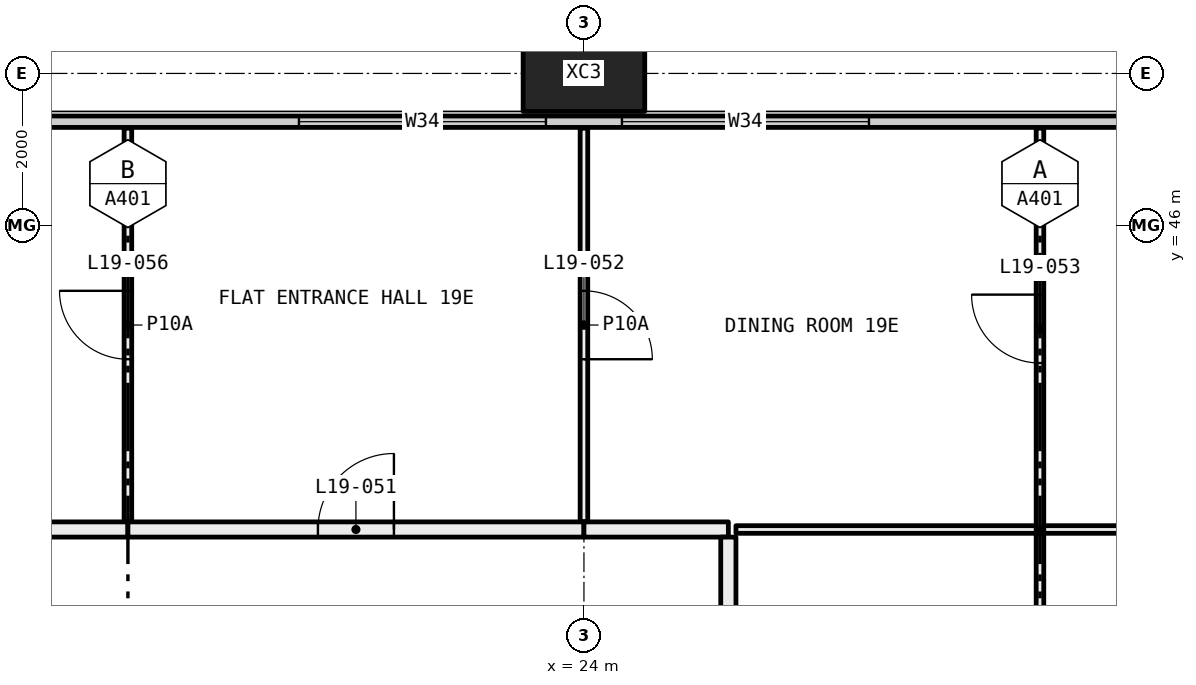
"""IFC4 building model, lengths in metres.
Left out: names, types, materials, properties, quantities, classifications, styles, units other than length and angle.
Written with IfcOpenShell. Run it as: python <this file> out.ifc"""

import sys

from ifc_helpers import new_model, si_unit, direction, frame, frame_2d, origin, origin_2d, place, context, subcontext, project, spatial, rectangle, hollow_rectangle, extrude, element, fill, save


model = new_model("IFC4")
c1 = context("Model", 3, precision=1e-05, world=origin(), true_north=direction((0.0, 1.0)))
c2 = subcontext(c1, "Body", "Model", "MODEL_VIEW")
j1 = project(units=[si_unit("LENGTHUNIT", "METRE"), si_unit("PLANEANGLEUNIT", "RADIAN")], contexts=[c1])
p1 = place(None, origin())
s1 = spatial("IfcSite", under=j1, at=p1, CompositionType="ELEMENT")
p2 = place(p1, origin())
s2 = spatial("IfcBuilding", under=s1, at=p2, CompositionType="ELEMENT")
p3 = place(p2, frame((0.0, 0.0, 78.3)))
s3 = spatial("IfcBuildingStorey", under=s2, at=p3, CompositionType="ELEMENT", Elevation=78.3)
p4 = place(p3, frame((24.0, 48.0, -0.4), z_axis=(0.0, 0.0, 1.0), x_axis=(1.0, 0.0, 0.0)))
e1 = element("IfcColumn", 1, at=p4, inside=s3, PredefinedType="COLUMN", context=c2, shape_type="SweptSolid", body=[
    extrude(hollow_rectangle(XDim=1.6, YDim=1.0, WallThickness=0.065, at=origin_2d()), origin(), (0.0, 0.0, 1.0), 3.45),
])
p5 = place(p3, frame((6.56, 47.365, 0.0), z_axis=(0.0, 0.0, 1.0), x_axis=(1.0, 0.0, 0.0)))
e2 = element("IfcWall", 2, at=p5, inside=s3, PredefinedType="ELEMENTEDWALL", context=c2, shape_type="SweptSolid", body=[
    extrude(rectangle(XDim=58.88, YDim=0.15, at=frame_2d((29.44, 0.0))), origin(), (0.0, 0.0, 1.0), 3.05),
])
p6 = place(p5, frame((0.44, 0.0, 0.45)))
e3 = element("IfcOpeningElement", 3, at=p6, cuts=e2, PredefinedType="OPENING", context=c2, shape_type="SweptSolid", body=[
    extrude(rectangle(XDim=4.5, YDim=2.55, at=frame_2d((2.25, 1.275))), frame((0.0, 0.085, 0.0), z_axis=(0.0, -1.0, 0.0), x_axis=(1.0, 0.0, 0.0)), (0.0, 0.0, 1.0), 0.17),
])
p7 = place(p5, frame((5.94, 0.0, 0.45)))
e4 = element("IfcOpeningElement", 4, at=p7, cuts=e2, PredefinedType="OPENING", context=c2, shape_type="SweptSolid", body=[
    extrude(rectangle(XDim=3.25, YDim=2.55, at=frame_2d((1.625, 1.275))), frame((0.0, 0.085, 0.0), z_axis=(0.0, -1.0, 0.0), x_axis=(1.0, 0.0, 0.0)), (0.0, 0.0, 1.0), 0.17),
])
p8 = place(p5, frame((13.69, 0.0, 0.45)))
e5 = element("IfcOpeningElement", 5, at=p8, cuts=e2, PredefinedType="OPENING", context=c2, shape_type="SweptSolid", body=[
    extrude(rectangle(XDim=3.25, YDim=2.55, at=frame_2d((1.625, 1.275))), frame((0.0, 0.085, 0.0), z_axis=(0.0, -1.0, 0.0), x_axis=(1.0, 0.0, 0.0)), (0.0, 0.0, 1.0), 0.17),
])
p9 = place(p5, frame((17.94, 0.0, 0.45)))
e6 = element("IfcOpeningElement", 6, at=p9, cuts=e2, PredefinedType="OPENING", context=c2, shape_type="SweptSolid", body=[
    extrude(rectangle(XDim=3.25, YDim=2.55, at=frame_2d((1.625, 1.275))), frame((0.0, 0.085, 0.0), z_axis=(0.0, -1.0, 0.0), x_axis=(1.0, 0.0, 0.0)), (0.0, 0.0, 1.0), 0.17),
])
p10 = place(p5, frame((26.94, 0.0, 0.45)))
e7 = element("IfcOpeningElement", 7, at=p10, cuts=e2, PredefinedType="OPENING", context=c2, shape_type="SweptSolid", body=[
    extrude(rectangle(XDim=2.0, YDim=2.55, at=frame_2d((1.0, 1.275))), frame((0.0, 0.085, 0.0), z_axis=(0.0, -1.0, 0.0), x_axis=(1.0, 0.0, 0.0)), (0.0, 0.0, 1.0), 0.17),
])
p11 = place(p5, frame((29.94, 0.0, 0.45)))
e8 = element("IfcOpeningElement", 8, at=p11, cuts=e2, PredefinedType="OPENING", context=c2, shape_type="SweptSolid", body=[
    extrude(rectangle(XDim=3.25, YDim=2.55, at=frame_2d((1.625, 1.275))), frame((0.0, 0.085, 0.0), z_axis=(0.0, -1.0, 0.0), x_axis=(1.0, 0.0, 0.0)), (0.0, 0.0, 1.0), 0.17),
])
p12 = place(p5, frame((37.69, 0.0, 0.45)))
e9 = element("IfcOpeningElement", 9, at=p12, cuts=e2, PredefinedType="OPENING", context=c2, shape_type="SweptSolid", body=[
    extrude(rectangle(XDim=3.25, YDim=2.55, at=frame_2d((1.625, 1.275))), frame((0.0, 0.085, 0.0), z_axis=(0.0, -1.0, 0.0), x_axis=(1.0, 0.0, 0.0)), (0.0, 0.0, 1.0), 0.17),
])
p13 = place(p5, frame((41.94, 0.0, 0.45)))
e10 = element("IfcOpeningElement", 10, at=p13, cuts=e2, PredefinedType="OPENING", context=c2, shape_type="SweptSolid", body=[
    extrude(rectangle(XDim=3.25, YDim=2.55, at=frame_2d((1.625, 1.275))), frame((0.0, 0.085, 0.0), z_axis=(0.0, -1.0, 0.0), x_axis=(1.0, 0.0, 0.0)), (0.0, 0.0, 1.0), 0.17),
])
p14 = place(p5, frame((50.94, 0.0, 0.45)))
e11 = element("IfcOpeningElement", 11, at=p14, cuts=e2, PredefinedType="OPENING", context=c2, shape_type="SweptSolid", body=[
    extrude(rectangle(XDim=2.0, YDim=2.55, at=frame_2d((1.0, 1.275))), frame((0.0, 0.085, 0.0), z_axis=(0.0, -1.0, 0.0), x_axis=(1.0, 0.0, 0.0)), (0.0, 0.0, 1.0), 0.17),
])
p15 = place(p5, frame((53.94, 0.0, 0.45)))
e12 = element("IfcOpeningElement", 12, at=p15, cuts=e2, PredefinedType="OPENING", context=c2, shape_type="SweptSolid", body=[
    extrude(rectangle(XDim=4.5, YDim=2.55, at=frame_2d((2.25, 1.275))), frame((0.0, 0.085, 0.0), z_axis=(0.0, -1.0, 0.0), x_axis=(1.0, 0.0, 0.0)), (0.0, 0.0, 1.0), 0.17),
])
p16 = place(p3, frame((18.0, 42.1, 0.0), z_axis=(0.0, 0.0, 1.0), x_axis=(0.0, 1.0, 0.0)))
e13 = element("IfcWall", 13, at=p16, inside=s3, PredefinedType="PARTITIONING", context=c2, shape_type="SweptSolid", body=[
    extrude(rectangle(XDim=5.18, YDim=0.1, at=frame_2d((2.59, 0.0))), origin(), (0.0, 0.0, 1.0), 3.05),
])
p17 = place(p16, frame((2.14, 0.0, 0.0)))
e14 = element("IfcOpeningElement", 14, at=p17, cuts=e13, PredefinedType="OPENING", context=c2, shape_type="SweptSolid", body=[
    extrude(rectangle(XDim=0.9, YDim=2.1, at=frame_2d((0.45, 1.05))), frame((0.0, 0.06, 0.0), z_axis=(0.0, -1.0, 0.0), x_axis=(1.0, 0.0, 0.0)), (0.0, 0.0, 1.0), 0.12),
])
p18 = place(p3, frame((12.0, 42.0, 0.0), z_axis=(0.0, 0.0, 1.0), x_axis=(1.0, 0.0, 0.0)))
e15 = element("IfcWall", 15, at=p18, inside=s3, PredefinedType="PARTITIONING", context=c2, shape_type="SweptSolid", body=[
    extrude(rectangle(XDim=6.0, YDim=0.2, at=frame_2d((3.0, 0.0))), origin(), (0.0, 0.0, 1.0), 3.05),
])
p19 = place(p3, frame((24.0, 42.1, 0.0), z_axis=(0.0, 0.0, 1.0), x_axis=(0.0, 1.0, 0.0)))
e16 = element("IfcWall", 16, at=p19, inside=s3, PredefinedType="PARTITIONING", context=c2, shape_type="SweptSolid", body=[
    extrude(rectangle(XDim=5.18, YDim=0.1, at=frame_2d((2.59, 0.0))), origin(), (0.0, 0.0, 1.0), 3.05),
])
p20 = place(p19, frame((2.14, 0.0, 0.0)))
e17 = element("IfcOpeningElement", 17, at=p20, cuts=e16, PredefinedType="OPENING", context=c2, shape_type="SweptSolid", body=[
    extrude(rectangle(XDim=0.9, YDim=2.1, at=frame_2d((0.45, 1.05))), frame((0.0, 0.06, 0.0), z_axis=(0.0, -1.0, 0.0), x_axis=(1.0, 0.0, 0.0)), (0.0, 0.0, 1.0), 0.12),
])
p21 = place(p3, frame((18.0, 42.0, 0.0), z_axis=(0.0, 0.0, 1.0), x_axis=(1.0, 0.0, 0.0)))
e18 = element("IfcWall", 18, at=p21, inside=s3, PredefinedType="PARTITIONING", context=c2, shape_type="SweptSolid", body=[
    extrude(rectangle(XDim=6.0, YDim=0.2, at=frame_2d((3.0, 0.0))), origin(), (0.0, 0.0, 1.0), 3.05),
])
p22 = place(p21, frame((2.5, 0.0, 0.0)))
e19 = element("IfcOpeningElement", 19, at=p22, cuts=e18, PredefinedType="OPENING", context=c2, shape_type="SweptSolid", body=[
    extrude(rectangle(XDim=1.0, YDim=2.1, at=frame_2d((0.5, 1.05))), frame((0.0, 0.11, 0.0), z_axis=(0.0, -1.0, 0.0), x_axis=(1.0, 0.0, 0.0)), (0.0, 0.0, 1.0), 0.22),
])
p23 = place(p3, frame((30.0, 42.0, 0.0), z_axis=(0.0, 0.0, 1.0), x_axis=(0.0, 1.0, 0.0)))
e20 = element("IfcWall", 20, at=p23, inside=s3, PredefinedType="PARTITIONING", context=c2, shape_type="SweptSolid", body=[
    extrude(rectangle(XDim=5.28, YDim=0.1, at=frame_2d((2.64, 0.0))), origin(), (0.0, 0.0, 1.0), 3.05),
])
p24 = place(p23, frame((2.19, 0.0, 0.0)))
e21 = element("IfcOpeningElement", 21, at=p24, cuts=e20, PredefinedType="OPENING", context=c2, shape_type="SweptSolid", body=[
    extrude(rectangle(XDim=0.9, YDim=2.1, at=frame_2d((0.45, 1.05))), frame((0.0, 0.06, 0.0), z_axis=(0.0, -1.0, 0.0), x_axis=(1.0, 0.0, 0.0)), (0.0, 0.0, 1.0), 0.12),
])
p25 = place(p3, frame((26.0, 42.0, 0.0), z_axis=(0.0, 0.0, 1.0), x_axis=(1.0, 0.0, 0.0)))
e22 = element("IfcWall", 22, at=p25, inside=s3, PredefinedType="PARTITIONING", context=c2, shape_type="SweptSolid", body=[
    extrude(rectangle(XDim=3.95, YDim=0.1, at=frame_2d((1.975, 0.0))), origin(), (0.0, 0.0, 1.0), 3.05),
])
p26 = place(p3, frame((24.0, 42.0, 0.0), z_axis=(0.0, 0.0, 1.0), x_axis=(1.0, 0.0, 0.0)))
e23 = element("IfcWall", 23, at=p26, inside=s3, PredefinedType="PARTITIONING", context=c2, shape_type="SweptSolid", body=[
    extrude(rectangle(XDim=1.9, YDim=0.2, at=frame_2d((0.95, 0.0))), origin(), (0.0, 0.0, 1.0), 3.05),
])
p27 = place(p3, frame((30.05, 42.0, 0.0), z_axis=(0.0, 0.0, 1.0), x_axis=(1.0, 0.0, 0.0)))
e24 = element("IfcWall", 24, at=p27, inside=s3, PredefinedType="PARTITIONING", context=c2, shape_type="SweptSolid", body=[
    extrude(rectangle(XDim=4.45, YDim=0.1, at=frame_2d((2.225, 0.0))), origin(), (0.0, 0.0, 1.0), 3.05),
])
p28 = place(p27, frame((1.775, 0.0, 0.0)))
e25 = element("IfcOpeningElement", 25, at=p28, cuts=e24, PredefinedType="OPENING", context=c2, shape_type="SweptSolid", body=[
    extrude(rectangle(XDim=0.9, YDim=2.1, at=frame_2d((0.45, 1.05))), frame((0.0, 0.06, 0.0), z_axis=(0.0, -1.0, 0.0), x_axis=(1.0, 0.0, 0.0)), (0.0, 0.0, 1.0), 0.12),
])
p29 = place(p3, frame((30.0, 36.1, 0.0), z_axis=(0.0, 0.0, 1.0), x_axis=(0.0, 1.0, 0.0)))
e26 = element("IfcWall", 26, at=p29, inside=s3, PredefinedType="PARTITIONING", context=c2, shape_type="SweptSolid", body=[
    extrude(rectangle(XDim=5.85, YDim=0.1, at=frame_2d((2.925, 0.0))), origin(), (0.0, 0.0, 1.0), 3.05),
])
p30 = place(p29, frame((2.475, 0.0, 0.0)))
e27 = element("IfcOpeningElement", 27, at=p30, cuts=e26, PredefinedType="OPENING", context=c2, shape_type="SweptSolid", body=[
    extrude(rectangle(XDim=0.9, YDim=2.1, at=frame_2d((0.45, 1.05))), frame((0.0, 0.06, 0.0), z_axis=(0.0, -1.0, 0.0), x_axis=(1.0, 0.0, 0.0)), (0.0, 0.0, 1.0), 0.12),
])
p31 = place(p3, frame((25.9, 41.9, 0.0), z_axis=(0.0, 0.0, 1.0), x_axis=(0.0, -1.0, 0.0)))
e28 = element("IfcWall", 28, at=p31, inside=s3, PredefinedType="PARTITIONING", context=c2, shape_type="SweptSolid", body=[
    extrude(rectangle(XDim=6.2, YDim=0.2, at=frame_2d((3.1, 0.0))), origin(), (0.0, 0.0, 1.0), 2.45),
])
p32 = place(p8, origin())
e29 = element("IfcWindow", 29, at=p32, inside=s3, PartitioningType="SINGLE_PANEL", PredefinedType="WINDOW", context=c2, shape_type="SweptSolid", body=[
    extrude(rectangle(XDim=3.25, YDim=2.55, at=frame_2d((1.625, 1.275))), frame((0.0, 0.03, 0.0), z_axis=(0.0, -1.0, 0.0), x_axis=(1.0, 0.0, 0.0)), (0.0, 0.0, 1.0), 0.06),
])
fill(e5, e29)
p33 = place(p9, origin())
e30 = element("IfcWindow", 30, at=p33, inside=s3, PartitioningType="SINGLE_PANEL", PredefinedType="WINDOW", context=c2, shape_type="SweptSolid", body=[
    extrude(rectangle(XDim=3.25, YDim=2.55, at=frame_2d((1.625, 1.275))), frame((0.0, 0.03, 0.0), z_axis=(0.0, -1.0, 0.0), x_axis=(1.0, 0.0, 0.0)), (0.0, 0.0, 1.0), 0.06),
])
fill(e6, e30)
p34 = place(p22, origin())
e31 = element("IfcDoor", 31, at=p34, inside=s3, OperationType="SINGLE_SWING_LEFT", PredefinedType="DOOR", context=c2, shape_type="SweptSolid", body=[
    extrude(rectangle(XDim=1.0, YDim=2.1, at=frame_2d((0.5, 1.05))), frame((0.0, 0.025, 0.0), z_axis=(0.0, -1.0, 0.0), x_axis=(1.0, 0.0, 0.0)), (0.0, 0.0, 1.0), 0.05),
])
fill(e19, e31)
p35 = place(p20, frame((0.9, 0.0, 0.0), x_axis=(-1.0, 0.0, 0.0)))
e32 = element("IfcDoor", 32, at=p35, inside=s3, OperationType="SINGLE_SWING_LEFT", PredefinedType="DOOR", context=c2, shape_type="SweptSolid", body=[
    extrude(rectangle(XDim=0.9, YDim=2.1, at=frame_2d((0.45, 1.05))), frame((0.0, 0.025, 0.0), z_axis=(0.0, -1.0, 0.0), x_axis=(1.0, 0.0, 0.0)), (0.0, 0.0, 1.0), 0.05),
])
fill(e17, e32)
p36 = place(p24, origin())
e33 = element("IfcDoor", 33, at=p36, inside=s3, OperationType="SINGLE_SWING_LEFT", PredefinedType="DOOR", context=c2, shape_type="SweptSolid", body=[
    extrude(rectangle(XDim=0.9, YDim=2.1, at=frame_2d((0.45, 1.05))), frame((0.0, 0.025, 0.0), z_axis=(0.0, -1.0, 0.0), x_axis=(1.0, 0.0, 0.0)), (0.0, 0.0, 1.0), 0.05),
])
fill(e21, e33)
p37 = place(p17, origin())
e34 = element("IfcDoor", 34, at=p37, inside=s3, OperationType="SINGLE_SWING_LEFT", PredefinedType="DOOR", context=c2, shape_type="SweptSolid", body=[
    extrude(rectangle(XDim=0.9, YDim=2.1, at=frame_2d((0.45, 1.05))), frame((0.0, 0.025, 0.0), z_axis=(0.0, -1.0, 0.0), x_axis=(1.0, 0.0, 0.0)), (0.0, 0.0, 1.0), 0.05),
])
fill(e14, e34)
save(model, sys.argv[1])
